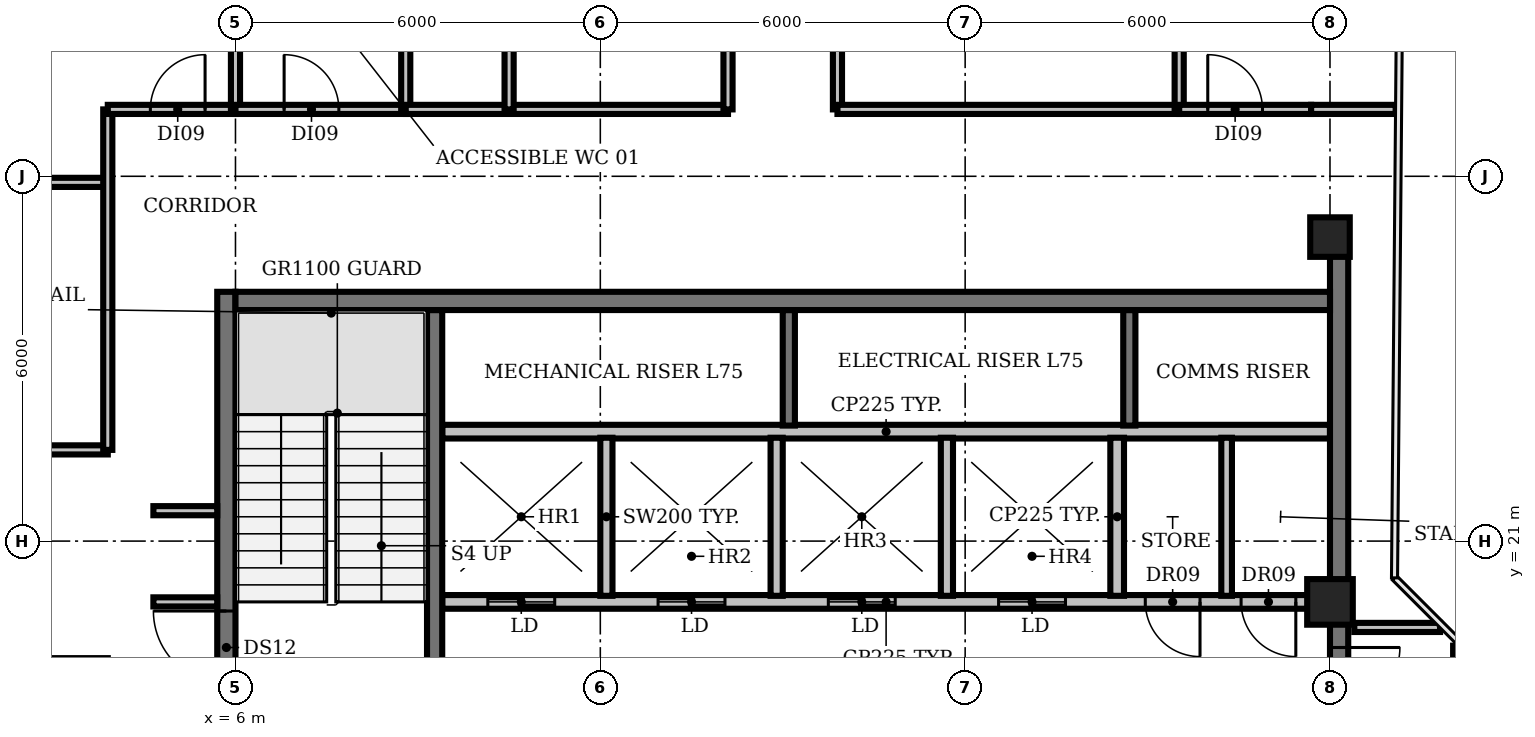
"""IFC4 building model, lengths in metres.
Left out: names, types, materials, properties, quantities, classifications, styles, units other than length and angle.
Written with IfcOpenShell. Run it as: python <this file> out.ifc"""

import sys

from ifc_helpers import new_model, si_unit, direction, frame, frame_2d, origin, origin_2d, place, context, subcontext, project, spatial, rectangle, circle, extrude, element, fill, save


model = new_model("IFC4")
c1 = context("Model", 3, precision=1e-05, world=origin(), true_north=direction((0.0, 1.0)))
c2 = subcontext(c1, "Body", "Model", "MODEL_VIEW")
j1 = project(units=[si_unit("LENGTHUNIT", "METRE"), si_unit("PLANEANGLEUNIT", "RADIAN")], contexts=[c1])
p1 = place(None, origin())
s1 = spatial("IfcSite", under=j1, at=p1, CompositionType="ELEMENT")
p2 = place(p1, origin())
s2 = spatial("IfcBuilding", under=s1, at=p2, CompositionType="ELEMENT")
p3 = place(p2, frame((0.0, 0.0, 335.6)))
s3 = spatial("IfcBuildingStorey", under=s2, at=p3, CompositionType="ELEMENT", Elevation=335.6)
p4 = place(p3, frame((24.0, 20.0, 0.0), z_axis=(0.0, 0.0, 1.0), x_axis=(1.0, 0.0, 0.0)))
e1 = element("IfcColumn", 1, at=p4, inside=s3, PredefinedType="COLUMN", context=c2, shape_type="SweptSolid", body=[
    extrude(circle(Radius=0.375, at=origin_2d()), origin(), (0.0, 0.0, 1.0), 3.9),
])
p5 = place(p3, frame((24.0, 26.0, 0.0), z_axis=(0.0, 0.0, 1.0), x_axis=(1.0, 0.0, 0.0)))
e2 = element("IfcColumn", 2, at=p5, inside=s3, PredefinedType="COLUMN", context=c2, shape_type="SweptSolid", body=[
    extrude(rectangle(XDim=0.65, YDim=0.65, at=origin_2d()), origin(), (0.0, 0.0, 1.0), 3.9),
])
p6 = place(p3, frame((24.0, 20.0, 0.0), z_axis=(0.0, 0.0, 1.0), x_axis=(-1.0, 0.0, 0.0)))
e3 = element("IfcWall", 3, at=p6, inside=s3, PredefinedType="PARTITIONING", context=c2, shape_type="SweptSolid", body=[
    extrude(rectangle(XDim=14.6, YDim=0.225, at=frame_2d((7.3, 0.0))), origin(), (0.0, 0.0, 1.0), 3.9),
])
p7 = place(p6, frame((12.75, 0.0, 0.0)))
e4 = element("IfcOpeningElement", 4, at=p7, cuts=e3, PredefinedType="OPENING", context=c2, shape_type="SweptSolid", body=[
    extrude(rectangle(XDim=1.1, YDim=2.1, at=frame_2d((0.55, 1.05))), frame((0.0, 0.123, 0.0), z_axis=(0.0, -1.0, 0.0), x_axis=(1.0, 0.0, 0.0)), (0.0, 0.0, 1.0), 0.245),
])
p8 = place(p6, frame((9.95, 0.0, 0.0)))
e5 = element("IfcOpeningElement", 5, at=p8, cuts=e3, PredefinedType="OPENING", context=c2, shape_type="SweptSolid", body=[
    extrude(rectangle(XDim=1.1, YDim=2.1, at=frame_2d((0.55, 1.05))), frame((0.0, 0.123, 0.0), z_axis=(0.0, -1.0, 0.0), x_axis=(1.0, 0.0, 0.0)), (0.0, 0.0, 1.0), 0.245),
])
p9 = place(p6, frame((7.15, 0.0, 0.0)))
e6 = element("IfcOpeningElement", 6, at=p9, cuts=e3, PredefinedType="OPENING", context=c2, shape_type="SweptSolid", body=[
    extrude(rectangle(XDim=1.1, YDim=2.1, at=frame_2d((0.55, 1.05))), frame((0.0, 0.123, 0.0), z_axis=(0.0, -1.0, 0.0), x_axis=(1.0, 0.0, 0.0)), (0.0, 0.0, 1.0), 0.245),
])
p10 = place(p6, frame((4.35, 0.0, 0.0)))
e7 = element("IfcOpeningElement", 7, at=p10, cuts=e3, PredefinedType="OPENING", context=c2, shape_type="SweptSolid", body=[
    extrude(rectangle(XDim=1.1, YDim=2.1, at=frame_2d((0.55, 1.05))), frame((0.0, 0.123, 0.0), z_axis=(0.0, -1.0, 0.0), x_axis=(1.0, 0.0, 0.0)), (0.0, 0.0, 1.0), 0.245),
])
p11 = place(p6, frame((2.137, 0.0, 0.0)))
e8 = element("IfcOpeningElement", 8, at=p11, cuts=e3, PredefinedType="OPENING", context=c2, shape_type="SweptSolid", body=[
    extrude(rectangle(XDim=0.9, YDim=2.1, at=frame_2d((0.45, 1.05))), frame((0.0, 0.123, 0.0), z_axis=(0.0, -1.0, 0.0), x_axis=(1.0, 0.0, 0.0)), (0.0, 0.0, 1.0), 0.245),
])
p12 = place(p6, frame((0.562, 0.0, 0.0)))
e9 = element("IfcOpeningElement", 9, at=p12, cuts=e3, PredefinedType="OPENING", context=c2, shape_type="SweptSolid", body=[
    extrude(rectangle(XDim=0.9, YDim=2.1, at=frame_2d((0.45, 1.05))), frame((0.0, 0.123, 0.0), z_axis=(0.0, -1.0, 0.0), x_axis=(1.0, 0.0, 0.0)), (0.0, 0.0, 1.0), 0.245),
])
p13 = place(p3, frame((9.4, 22.8, 0.0), z_axis=(0.0, 0.0, 1.0), x_axis=(1.0, 0.0, 0.0)))
e10 = element("IfcWall", 10, at=p13, inside=s3, PredefinedType="PARTITIONING", context=c2, shape_type="SweptSolid", body=[
    extrude(rectangle(XDim=14.6, YDim=0.225, at=frame_2d((7.3, 0.0))), origin(), (0.0, 0.0, 1.0), 3.9),
])
p14 = place(p3, frame((9.275, 18.375, 0.0), z_axis=(0.0, 0.0, 1.0), x_axis=(0.0, 1.0, 0.0)))
e11 = element("IfcWall", 11, at=p14, inside=s3, PredefinedType="SHEAR", context=c2, shape_type="SweptSolid", body=[
    extrude(rectangle(XDim=6.425, YDim=0.25, at=frame_2d((3.212, 0.0))), origin(), (0.0, 0.0, 1.0), 3.9),
])
for number, where, z_axis, x_axis in (
    (12, (12.1, 20.1, 0.0), (0.0, 0.0, 1.0), (0.0, 1.0, 0.0)),
    (13, (14.9, 20.1, 0.0), (0.0, 0.0, 1.0), (0.0, 1.0, 0.0)),
):
    element("IfcWall", number, at=place(p3, frame(where, z_axis=z_axis, x_axis=x_axis)), inside=s3, PredefinedType="SOLIDWALL", context=c2, shape_type="SweptSolid", body=[
        extrude(rectangle(XDim=2.6, YDim=0.2, at=frame_2d((1.3, 0.0))), origin(), (0.0, 0.0, 1.0), 3.9),
    ])
p15 = place(p3, frame((15.1, 22.9, 0.0), z_axis=(0.0, 0.0, 1.0), x_axis=(0.0, 1.0, 0.0)))
e14 = element("IfcWall", 14, at=p15, inside=s3, PredefinedType="SHEAR", context=c2, shape_type="SweptSolid", body=[
    extrude(rectangle(XDim=1.9, YDim=0.2, at=frame_2d((0.95, 0.0))), origin(), (0.0, 0.0, 1.0), 3.9),
])
p16 = place(p3, frame((17.7, 20.1, 0.0), z_axis=(0.0, 0.0, 1.0), x_axis=(0.0, 1.0, 0.0)))
e15 = element("IfcWall", 15, at=p16, inside=s3, PredefinedType="SOLIDWALL", context=c2, shape_type="SweptSolid", body=[
    extrude(rectangle(XDim=2.6, YDim=0.2, at=frame_2d((1.3, 0.0))), origin(), (0.0, 0.0, 1.0), 3.9),
])
p17 = place(p3, frame((20.5, 20.1, 0.0), z_axis=(0.0, 0.0, 1.0), x_axis=(0.0, 1.0, 0.0)))
e16 = element("IfcWall", 16, at=p17, inside=s3, PredefinedType="PARTITIONING", context=c2, shape_type="SweptSolid", body=[
    extrude(rectangle(XDim=2.6, YDim=0.225, at=frame_2d((1.3, 0.0))), origin(), (0.0, 0.0, 1.0), 3.9),
])
p18 = place(p3, frame((20.7, 22.9, 0.0), z_axis=(0.0, 0.0, 1.0), x_axis=(0.0, 1.0, 0.0)))
e17 = element("IfcWall", 17, at=p18, inside=s3, PredefinedType="SHEAR", context=c2, shape_type="SweptSolid", body=[
    extrude(rectangle(XDim=1.9, YDim=0.2, at=frame_2d((0.95, 0.0))), origin(), (0.0, 0.0, 1.0), 3.9),
])
p19 = place(p3, frame((22.3, 20.1, 0.0), z_axis=(0.0, 0.0, 1.0), x_axis=(0.0, 1.0, 0.0)))
e18 = element("IfcWall", 18, at=p19, inside=s3, PredefinedType="PARTITIONING", context=c2, shape_type="SweptSolid", body=[
    extrude(rectangle(XDim=2.6, YDim=0.175, at=frame_2d((1.3, 0.0))), origin(), (0.0, 0.0, 1.0), 3.9),
])
p20 = place(p3, frame((5.85, 5.1, 0.0), z_axis=(0.0, 0.0, 1.0), x_axis=(0.0, 1.0, 0.0)))
e19 = element("IfcWall", 19, at=p20, inside=s3, PredefinedType="SHEAR", context=c2, shape_type="SweptSolid", body=[
    extrude(rectangle(XDim=20.0, YDim=0.3, at=frame_2d((10.0, 0.0))), origin(), (0.0, 0.0, 1.0), 3.9),
])
p21 = place(p20, frame((0.55, 0.0, 0.0)))
e20 = element("IfcOpeningElement", 20, at=p21, cuts=e19, PredefinedType="OPENING", context=c2, shape_type="SweptSolid", body=[
    extrude(rectangle(XDim=1.5, YDim=2.1, at=frame_2d((0.75, 1.05))), frame((0.0, 0.16, 0.0), z_axis=(0.0, -1.0, 0.0), x_axis=(1.0, 0.0, 0.0)), (0.0, 0.0, 1.0), 0.32),
])
p22 = place(p20, frame((7.0, 0.0, 0.0)))
e21 = element("IfcOpeningElement", 21, at=p22, cuts=e19, PredefinedType="OPENING", context=c2, shape_type="SweptSolid", body=[
    extrude(rectangle(XDim=1.2, YDim=2.1, at=frame_2d((0.6, 1.05))), frame((0.0, 0.16, 0.0), z_axis=(0.0, -1.0, 0.0), x_axis=(1.0, 0.0, 0.0)), (0.0, 0.0, 1.0), 0.32),
])
p23 = place(p20, frame((13.55, 0.0, 0.0)))
e22 = element("IfcOpeningElement", 22, at=p23, cuts=e19, PredefinedType="OPENING", context=c2, shape_type="SweptSolid", body=[
    extrude(rectangle(XDim=1.2, YDim=2.1, at=frame_2d((0.6, 1.05))), frame((0.0, 0.16, 0.0), z_axis=(0.0, -1.0, 0.0), x_axis=(1.0, 0.0, 0.0)), (0.0, 0.0, 1.0), 0.32),
])
p24 = place(p3, frame((24.15, 25.705, 0.0), z_axis=(0.0, 0.0, 1.0), x_axis=(0.0, -1.0, 0.0)))
e23 = element("IfcWall", 23, at=p24, inside=s3, PredefinedType="SHEAR", context=c2, shape_type="SweptSolid", body=[
    extrude(rectangle(XDim=20.605, YDim=0.3, at=frame_2d((10.302, 0.0))), origin(), (0.0, 0.0, 1.0), 3.9),
])
p25 = place(p24, frame((18.555, 0.0, 0.0)))
e24 = element("IfcOpeningElement", 24, at=p25, cuts=e23, PredefinedType="OPENING", context=c2, shape_type="SweptSolid", body=[
    extrude(rectangle(XDim=1.5, YDim=2.1, at=frame_2d((0.75, 1.05))), frame((0.0, 0.16, 0.0), z_axis=(0.0, -1.0, 0.0), x_axis=(1.0, 0.0, 0.0)), (0.0, 0.0, 1.0), 0.32),
])
p26 = place(p24, frame((12.455, 0.0, 0.0)))
e25 = element("IfcOpeningElement", 25, at=p26, cuts=e23, PredefinedType="OPENING", context=c2, shape_type="SweptSolid", body=[
    extrude(rectangle(XDim=0.9, YDim=2.1, at=frame_2d((0.45, 1.05))), frame((0.0, 0.16, 0.0), z_axis=(0.0, -1.0, 0.0), x_axis=(1.0, 0.0, 0.0)), (0.0, 0.0, 1.0), 0.32),
])
p27 = place(p24, frame((6.455, 0.0, 0.0)))
e26 = element("IfcOpeningElement", 26, at=p27, cuts=e23, PredefinedType="OPENING", context=c2, shape_type="SweptSolid", body=[
    extrude(rectangle(XDim=2.0, YDim=2.1, at=frame_2d((1.0, 1.05))), frame((0.0, 0.16, 0.0), z_axis=(0.0, -1.0, 0.0), x_axis=(1.0, 0.0, 0.0)), (0.0, 0.0, 1.0), 0.32),
])
p28 = place(p3, frame((6.0, 24.95, 0.0), z_axis=(0.0, 0.0, 1.0), x_axis=(1.0, 0.0, 0.0)))
e27 = element("IfcWall", 27, at=p28, inside=s3, PredefinedType="SHEAR", context=c2, shape_type="SweptSolid", body=[
    extrude(rectangle(XDim=18.0, YDim=0.3, at=frame_2d((9.0, 0.0))), origin(), (0.0, 0.0, 1.0), 3.9),
])
p29 = place(p3, frame((-0.98, 26.9, 0.0), z_axis=(0.0, 0.0, 1.0), x_axis=(1.0, 0.0, 0.0)))
e28 = element("IfcWall", 28, at=p29, inside=s3, PredefinedType="PARTITIONING", context=c2, shape_type="SweptSolid", body=[
    extrude(rectangle(XDim=4.88, YDim=0.15, at=frame_2d((2.44, 0.0))), origin(), (0.0, 0.0, 1.0), 2.95),
])
p30 = place(p3, frame((2.79, 22.5, 0.0), z_axis=(0.0, 0.0, 1.0), x_axis=(1.0, 0.0, 0.0)))
e29 = element("IfcWall", 29, at=p30, inside=s3, PredefinedType="PARTITIONING", context=c2, shape_type="SweptSolid", body=[
    extrude(rectangle(XDim=1.11, YDim=0.15, at=frame_2d((0.555, 0.0))), origin(), (0.0, 0.0, 1.0), 2.95),
])
p31 = place(p3, frame((3.9, 22.5, 0.0), z_axis=(0.0, 0.0, 1.0), x_axis=(0.0, 1.0, 0.0)))
e30 = element("IfcWall", 30, at=p31, inside=s3, PredefinedType="PARTITIONING", context=c2, shape_type="SweptSolid", body=[
    extrude(rectangle(XDim=5.6, YDim=0.15, at=frame_2d((2.8, 0.0))), origin(), (0.0, 0.0, 1.0), 2.95),
])
p32 = place(p3, frame((3.9, 28.1, 0.0), z_axis=(0.0, 0.0, 1.0), x_axis=(1.0, 0.0, 0.0)))
e31 = element("IfcWall", 31, at=p32, inside=s3, PredefinedType="PARTITIONING", context=c2, shape_type="SweptSolid", body=[
    extrude(rectangle(XDim=2.1, YDim=0.15, at=frame_2d((1.05, 0.0))), origin(), (0.0, 0.0, 1.0), 2.95),
])
p33 = place(p32, frame((0.7, 0.0, 0.0)))
e32 = element("IfcOpeningElement", 32, at=p33, cuts=e31, PredefinedType="OPENING", context=c2, shape_type="SweptSolid", body=[
    extrude(rectangle(XDim=0.9, YDim=2.1, at=frame_2d((0.45, 1.05))), frame((0.0, 0.085, 0.0), z_axis=(0.0, -1.0, 0.0), x_axis=(1.0, 0.0, 0.0)), (0.0, 0.0, 1.0), 0.17),
])
for number, where, z_axis, x_axis in (
    (33, (4.65, 20.0, 0.0), (0.0, 0.0, 1.0), (1.0, 0.0, 0.0)),
    (34, (4.65, 21.5, 0.0), (0.0, 0.0, 1.0), (1.0, 0.0, 0.0)),
):
    element("IfcWall", number, at=place(p3, frame(where, z_axis=z_axis, x_axis=x_axis)), inside=s3, PredefinedType="PARTITIONING", context=c2, shape_type="SweptSolid", body=[
        extrude(rectangle(XDim=1.05, YDim=0.15, at=frame_2d((0.525, 0.0))), origin(), (0.0, 0.0, 1.0), 2.95),
    ])
p34 = place(p3, frame((6.0, 28.1, 0.0), z_axis=(0.0, 0.0, 1.0), x_axis=(0.0, 1.0, 0.0)))
e35 = element("IfcWall", 35, at=p34, inside=s3, PredefinedType="PARTITIONING", context=c2, shape_type="SweptSolid", body=[
    extrude(rectangle(XDim=3.53, YDim=0.15, at=frame_2d((1.765, 0.0))), origin(), (0.0, 0.0, 1.0), 2.95),
])
p35 = place(p3, frame((6.0, 28.1, 0.0), z_axis=(0.0, 0.0, 1.0), x_axis=(1.0, 0.0, 0.0)))
e36 = element("IfcWall", 36, at=p35, inside=s3, PredefinedType="PARTITIONING", context=c2, shape_type="SweptSolid", body=[
    extrude(rectangle(XDim=2.8, YDim=0.15, at=frame_2d((1.4, 0.0))), origin(), (0.0, 0.0, 1.0), 2.95),
])
p36 = place(p35, frame((0.8, 0.0, 0.0)))
e37 = element("IfcOpeningElement", 37, at=p36, cuts=e36, PredefinedType="OPENING", context=c2, shape_type="SweptSolid", body=[
    extrude(rectangle(XDim=0.9, YDim=2.1, at=frame_2d((0.45, 1.05))), frame((0.0, 0.085, 0.0), z_axis=(0.0, -1.0, 0.0), x_axis=(1.0, 0.0, 0.0)), (0.0, 0.0, 1.0), 0.17),
])
p37 = place(p3, frame((8.8, 28.1, 0.0), z_axis=(0.0, 0.0, 1.0), x_axis=(0.0, 1.0, 0.0)))
e38 = element("IfcWall", 38, at=p37, inside=s3, PredefinedType="PARTITIONING", context=c2, shape_type="SweptSolid", body=[
    extrude(rectangle(XDim=4.8, YDim=0.15, at=frame_2d((2.4, 0.0))), origin(), (0.0, 0.0, 1.0), 2.95),
])
p38 = place(p3, frame((8.8, 28.1, 0.0), z_axis=(0.0, 0.0, 1.0), x_axis=(1.0, 0.0, 0.0)))
e39 = element("IfcWall", 39, at=p38, inside=s3, PredefinedType="PARTITIONING", context=c2, shape_type="SweptSolid", body=[
    extrude(rectangle(XDim=5.3, YDim=0.15, at=frame_2d((2.65, 0.0))), origin(), (0.0, 0.0, 1.0), 2.95),
])
p39 = place(p3, frame((10.5, 28.1, 0.0), z_axis=(0.0, 0.0, 1.0), x_axis=(0.0, 1.0, 0.0)))
e40 = element("IfcWall", 40, at=p39, inside=s3, PredefinedType="PARTITIONING", context=c2, shape_type="SweptSolid", body=[
    extrude(rectangle(XDim=4.8, YDim=0.15, at=frame_2d((2.4, 0.0))), origin(), (0.0, 0.0, 1.0), 2.95),
])
p40 = place(p3, frame((14.1, 28.1, 0.0), z_axis=(0.0, 0.0, 1.0), x_axis=(0.0, 1.0, 0.0)))
e41 = element("IfcWall", 41, at=p40, inside=s3, PredefinedType="PARTITIONING", context=c2, shape_type="SweptSolid", body=[
    extrude(rectangle(XDim=4.8, YDim=0.15, at=frame_2d((2.4, 0.0))), origin(), (0.0, 0.0, 1.0), 2.95),
])
p41 = place(p40, frame((1.9, 0.0, 0.0)))
e42 = element("IfcOpeningElement", 42, at=p41, cuts=e41, PredefinedType="OPENING", context=c2, shape_type="SweptSolid", body=[
    extrude(rectangle(XDim=0.9, YDim=2.1, at=frame_2d((0.45, 1.05))), frame((0.0, 0.085, 0.0), z_axis=(0.0, -1.0, 0.0), x_axis=(1.0, 0.0, 0.0)), (0.0, 0.0, 1.0), 0.17),
])
p42 = place(p3, frame((15.9, 28.1, 0.0), z_axis=(0.0, 0.0, 1.0), x_axis=(0.0, 1.0, 0.0)))
e43 = element("IfcWall", 43, at=p42, inside=s3, PredefinedType="PARTITIONING", context=c2, shape_type="SweptSolid", body=[
    extrude(rectangle(XDim=4.8, YDim=0.15, at=frame_2d((2.4, 0.0))), origin(), (0.0, 0.0, 1.0), 2.95),
])
p43 = place(p3, frame((15.9, 28.1, 0.0), z_axis=(0.0, 0.0, 1.0), x_axis=(1.0, 0.0, 0.0)))
e44 = element("IfcWall", 44, at=p43, inside=s3, PredefinedType="PARTITIONING", context=c2, shape_type="SweptSolid", body=[
    extrude(rectangle(XDim=5.62, YDim=0.15, at=frame_2d((2.81, 0.0))), origin(), (0.0, 0.0, 1.0), 2.95),
])
p44 = place(p3, frame((21.52, 28.1, 0.0), z_axis=(0.0, 0.0, 1.0), x_axis=(0.0, 1.0, 0.0)))
e45 = element("IfcWall", 45, at=p44, inside=s3, PredefinedType="PARTITIONING", context=c2, shape_type="SweptSolid", body=[
    extrude(rectangle(XDim=4.8, YDim=0.15, at=frame_2d((2.4, 0.0))), origin(), (0.0, 0.0, 1.0), 2.95),
])
p45 = place(p3, frame((21.52, 28.1, 0.0), z_axis=(0.0, 0.0, 1.0), x_axis=(1.0, 0.0, 0.0)))
e46 = element("IfcWall", 46, at=p45, inside=s3, PredefinedType="PARTITIONING", context=c2, shape_type="SweptSolid", body=[
    extrude(rectangle(XDim=2.17, YDim=0.15, at=frame_2d((1.085, 0.0))), origin(), (0.0, 0.0, 1.0), 2.95),
])
p46 = place(p45, frame((0.47, 0.0, 0.0)))
e47 = element("IfcOpeningElement", 47, at=p46, cuts=e46, PredefinedType="OPENING", context=c2, shape_type="SweptSolid", body=[
    extrude(rectangle(XDim=0.9, YDim=2.1, at=frame_2d((0.45, 1.05))), frame((0.0, 0.085, 0.0), z_axis=(0.0, -1.0, 0.0), x_axis=(1.0, 0.0, 0.0)), (0.0, 0.0, 1.0), 0.17),
])
p47 = place(p3, frame((23.69, 28.1, 0.0), z_axis=(0.0, 0.0, 1.0), x_axis=(1.0, 0.0, 0.0)))
e48 = element("IfcWall", 48, at=p47, inside=s3, PredefinedType="PARTITIONING", context=c2, shape_type="SweptSolid", body=[
    extrude(rectangle(XDim=1.39, YDim=0.15, at=frame_2d((0.695, 0.0))), origin(), (0.0, 0.0, 1.0), 2.95),
])
p48 = place(p3, frame((24.4, 19.58, 0.0), z_axis=(0.0, 0.0, 1.0), x_axis=(1.0, 0.0, 0.0)))
e49 = element("IfcWall", 49, at=p48, inside=s3, PredefinedType="PARTITIONING", context=c2, shape_type="SweptSolid", body=[
    extrude(rectangle(XDim=1.41, YDim=0.15, at=frame_2d((0.705, 0.0))), origin(), (0.0, 0.0, 1.0), 2.95),
])
p49 = place(p3, frame((26.1, 10.1, 0.0), z_axis=(0.0, 0.0, 1.0), x_axis=(0.0, 1.0, 0.0)))
e50 = element("IfcWall", 50, at=p49, inside=s3, PredefinedType="PARTITIONING", context=c2, shape_type="SweptSolid", body=[
    extrude(rectangle(XDim=9.18, YDim=0.15, at=frame_2d((4.59, 0.0))), origin(), (0.0, 0.0, 1.0), 2.95),
])
p50 = place(p49, frame((3.8, 0.0, 0.0)))
e51 = element("IfcOpeningElement", 51, at=p50, cuts=e50, PredefinedType="OPENING", context=c2, shape_type="SweptSolid", body=[
    extrude(rectangle(XDim=1.8, YDim=2.1, at=frame_2d((0.9, 1.05))), frame((0.0, 0.085, 0.0), z_axis=(0.0, -1.0, 0.0), x_axis=(1.0, 0.0, 0.0)), (0.0, 0.0, 1.0), 0.17),
])
p51 = place(p7, origin())
e52 = element("IfcDoor", 52, at=p51, inside=s3, OperationType="DOUBLE_DOOR_SLIDING", PredefinedType="DOOR", context=c2, shape_type="SweptSolid", body=[
    extrude(rectangle(XDim=1.1, YDim=2.1, at=frame_2d((0.55, 1.05))), frame((0.0, 0.025, 0.0), z_axis=(0.0, -1.0, 0.0), x_axis=(1.0, 0.0, 0.0)), (0.0, 0.0, 1.0), 0.05),
])
fill(e4, e52)
p52 = place(p8, origin())
e53 = element("IfcDoor", 53, at=p52, inside=s3, OperationType="DOUBLE_DOOR_SLIDING", PredefinedType="DOOR", context=c2, shape_type="SweptSolid", body=[
    extrude(rectangle(XDim=1.1, YDim=2.1, at=frame_2d((0.55, 1.05))), frame((0.0, 0.025, 0.0), z_axis=(0.0, -1.0, 0.0), x_axis=(1.0, 0.0, 0.0)), (0.0, 0.0, 1.0), 0.05),
])
fill(e5, e53)
p53 = place(p9, origin())
e54 = element("IfcDoor", 54, at=p53, inside=s3, OperationType="DOUBLE_DOOR_SLIDING", PredefinedType="DOOR", context=c2, shape_type="SweptSolid", body=[
    extrude(rectangle(XDim=1.1, YDim=2.1, at=frame_2d((0.55, 1.05))), frame((0.0, 0.025, 0.0), z_axis=(0.0, -1.0, 0.0), x_axis=(1.0, 0.0, 0.0)), (0.0, 0.0, 1.0), 0.05),
])
fill(e6, e54)
p54 = place(p10, origin())
e55 = element("IfcDoor", 55, at=p54, inside=s3, OperationType="DOUBLE_DOOR_SLIDING", PredefinedType="DOOR", context=c2, shape_type="SweptSolid", body=[
    extrude(rectangle(XDim=1.1, YDim=2.1, at=frame_2d((0.55, 1.05))), frame((0.0, 0.025, 0.0), z_axis=(0.0, -1.0, 0.0), x_axis=(1.0, 0.0, 0.0)), (0.0, 0.0, 1.0), 0.05),
])
fill(e7, e55)
p55 = place(p11, origin())
e56 = element("IfcDoor", 56, at=p55, inside=s3, OperationType="SINGLE_SWING_LEFT", PredefinedType="DOOR", context=c2, shape_type="SweptSolid", body=[
    extrude(rectangle(XDim=0.9, YDim=2.1, at=frame_2d((0.45, 1.05))), frame((0.0, 0.025, 0.0), z_axis=(0.0, -1.0, 0.0), x_axis=(1.0, 0.0, 0.0)), (0.0, 0.0, 1.0), 0.05),
])
fill(e8, e56)
p56 = place(p12, origin())
e57 = element("IfcDoor", 57, at=p56, inside=s3, OperationType="SINGLE_SWING_LEFT", PredefinedType="DOOR", context=c2, shape_type="SweptSolid", body=[
    extrude(rectangle(XDim=0.9, YDim=2.1, at=frame_2d((0.45, 1.05))), frame((0.0, 0.025, 0.0), z_axis=(0.0, -1.0, 0.0), x_axis=(1.0, 0.0, 0.0)), (0.0, 0.0, 1.0), 0.05),
])
fill(e9, e57)
p57 = place(p23, origin())
e58 = element("IfcDoor", 58, at=p57, inside=s3, OperationType="SINGLE_SWING_RIGHT", PredefinedType="DOOR", context=c2, shape_type="SweptSolid", body=[
    extrude(rectangle(XDim=1.2, YDim=2.1, at=frame_2d((0.6, 1.05))), frame((0.0, 0.025, 0.0), z_axis=(0.0, -1.0, 0.0), x_axis=(1.0, 0.0, 0.0)), (0.0, 0.0, 1.0), 0.05),
])
fill(e22, e58)
p58 = place(p27, origin())
e59 = element("IfcDoor", 59, at=p58, inside=s3, OperationType="DOUBLE_DOOR_SINGLE_SWING", PredefinedType="DOOR", context=c2, shape_type="SweptSolid", body=[
    extrude(rectangle(XDim=2.0, YDim=2.1, at=frame_2d((1.0, 1.05))), frame((0.0, 0.025, 0.0), z_axis=(0.0, -1.0, 0.0), x_axis=(1.0, 0.0, 0.0)), (0.0, 0.0, 1.0), 0.05),
])
fill(e26, e59)
p59 = place(p33, origin())
e60 = element("IfcDoor", 60, at=p59, inside=s3, OperationType="SINGLE_SWING_RIGHT", PredefinedType="DOOR", context=c2, shape_type="SweptSolid", body=[
    extrude(rectangle(XDim=0.9, YDim=2.1, at=frame_2d((0.45, 1.05))), frame((0.0, 0.025, 0.0), z_axis=(0.0, -1.0, 0.0), x_axis=(1.0, 0.0, 0.0)), (0.0, 0.0, 1.0), 0.05),
])
fill(e32, e60)
p60 = place(p36, origin())
e61 = element("IfcDoor", 61, at=p60, inside=s3, OperationType="SINGLE_SWING_LEFT", PredefinedType="DOOR", context=c2, shape_type="SweptSolid", body=[
    extrude(rectangle(XDim=0.9, YDim=2.1, at=frame_2d((0.45, 1.05))), frame((0.0, 0.025, 0.0), z_axis=(0.0, -1.0, 0.0), x_axis=(1.0, 0.0, 0.0)), (0.0, 0.0, 1.0), 0.05),
])
fill(e37, e61)
p61 = place(p46, origin())
e62 = element("IfcDoor", 62, at=p61, inside=s3, OperationType="SINGLE_SWING_LEFT", PredefinedType="DOOR", context=c2, shape_type="SweptSolid", body=[
    extrude(rectangle(XDim=0.9, YDim=2.1, at=frame_2d((0.45, 1.05))), frame((0.0, 0.025, 0.0), z_axis=(0.0, -1.0, 0.0), x_axis=(1.0, 0.0, 0.0)), (0.0, 0.0, 1.0), 0.05),
])
fill(e47, e62)
save(model, sys.argv[1])
